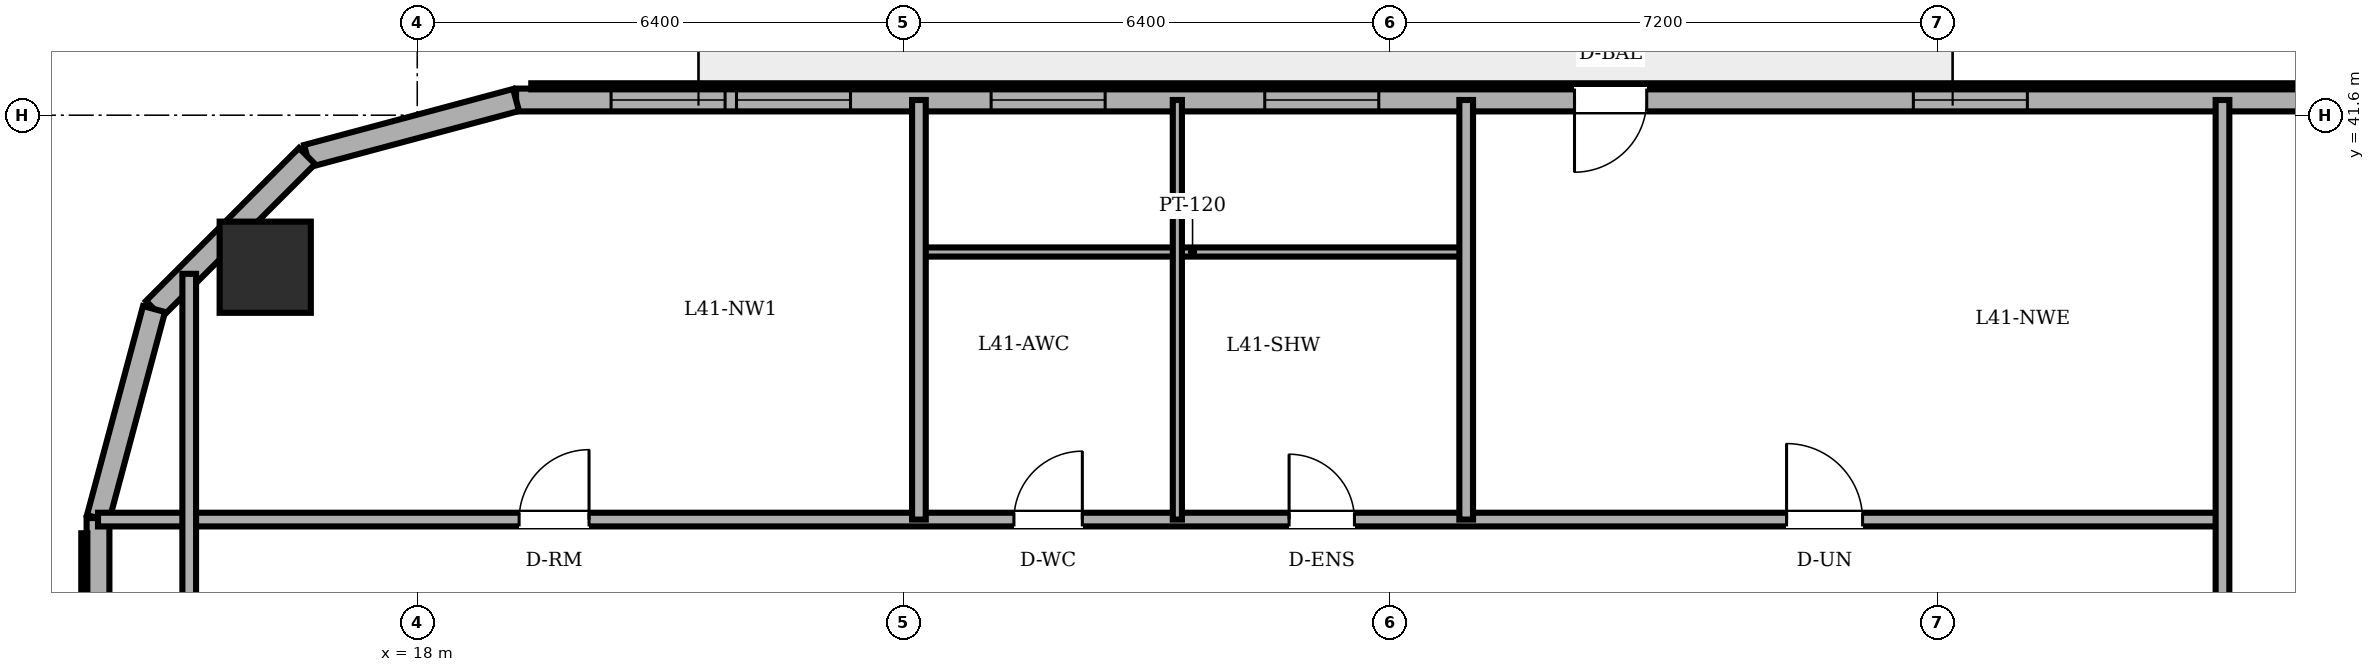
"""IFC4 building model, lengths in metres.
Left out: names, types, materials, properties, quantities, classifications, styles, units other than length and angle.
Written with IfcOpenShell. Run it as: python <this file> out.ifc"""

import sys

from ifc_helpers import new_model, si_unit, direction, frame, frame_2d, origin, origin_2d, place, context, subcontext, project, spatial, rectangle, circle, extrude, element, fill, save


model = new_model("IFC4")
c1 = context("Model", 3, precision=1e-05, world=origin(), true_north=direction((0.0, 1.0)))
c2 = subcontext(c1, "Body", "Model", "MODEL_VIEW")
j1 = project(units=[si_unit("LENGTHUNIT", "METRE"), si_unit("PLANEANGLEUNIT", "RADIAN")], contexts=[c1])
p1 = place(None, origin())
s1 = spatial("IfcSite", under=j1, at=p1, CompositionType="ELEMENT")
p2 = place(p1, origin())
s2 = spatial("IfcBuilding", under=s1, at=p2, CompositionType="ELEMENT")
p3 = place(p2, frame((0.0, 0.0, 158.2)))
s3 = spatial("IfcBuildingStorey", under=s2, at=p3, CompositionType="ELEMENT", Elevation=158.2)
p4 = place(p3, frame((16.0, 39.6, 0.0), z_axis=(0.0, 0.0, 1.0), x_axis=(1.0, 0.0, 0.0)))
e1 = element("IfcColumn", 1, at=p4, inside=s3, PredefinedType="COLUMN", context=c2, shape_type="SweptSolid", body=[
    extrude(circle(Radius=0.6, at=origin_2d()), origin(), (0.0, 0.0, 1.0), 3.6),
])
p5 = place(p3, frame((49.582, 41.8, 0.0), z_axis=(0.0, 0.0, 1.0), x_axis=(-1.0, 0.0, 0.0)))
e2 = element("IfcWall", 2, at=p5, inside=s3, PredefinedType="SOLIDWALL", context=c2, shape_type="SweptSolid", body=[
    extrude(rectangle(XDim=30.282, YDim=0.3, at=frame_2d((15.141, 0.0))), origin(), (0.0, 0.0, 1.0), 3.4),
])
p6 = place(p5, frame((15.407, 0.0, 0.0)))
e3 = element("IfcOpeningElement", 3, at=p6, cuts=e2, PredefinedType="OPENING", context=c2, shape_type="SweptSolid", body=[
    extrude(rectangle(XDim=0.95, YDim=2.2, at=frame_2d((0.475, 1.1))), frame((0.0, 0.16, 0.0), z_axis=(0.0, -1.0, 0.0), x_axis=(1.0, 0.0, 0.0)), (0.0, 0.0, 1.0), 0.32),
])
p7 = place(p5, frame((2.094, 0.0, 0.85)))
e4 = element("IfcOpeningElement", 4, at=p7, cuts=e2, PredefinedType="OPENING", context=c2, shape_type="SweptSolid", body=[
    extrude(rectangle(XDim=1.5, YDim=1.55, at=frame_2d((0.75, 0.775))), frame((0.0, 0.16, 0.0), z_axis=(0.0, -1.0, 0.0), x_axis=(1.0, 0.0, 0.0)), (0.0, 0.0, 1.0), 0.32),
])
p8 = place(p5, frame((4.588, 0.0, 0.85)))
e5 = element("IfcOpeningElement", 5, at=p8, cuts=e2, PredefinedType="OPENING", context=c2, shape_type="SweptSolid", body=[
    extrude(rectangle(XDim=1.5, YDim=1.55, at=frame_2d((0.75, 0.775))), frame((0.0, 0.16, 0.0), z_axis=(0.0, -1.0, 0.0), x_axis=(1.0, 0.0, 0.0)), (0.0, 0.0, 1.0), 0.32),
])
p9 = place(p5, frame((10.399, 0.0, 0.85)))
e6 = element("IfcOpeningElement", 6, at=p9, cuts=e2, PredefinedType="OPENING", context=c2, shape_type="SweptSolid", body=[
    extrude(rectangle(XDim=1.5, YDim=1.55, at=frame_2d((0.75, 0.775))), frame((0.0, 0.16, 0.0), z_axis=(0.0, -1.0, 0.0), x_axis=(1.0, 0.0, 0.0)), (0.0, 0.0, 1.0), 0.32),
])
p10 = place(p5, frame((18.932, 0.0, 0.85)))
e7 = element("IfcOpeningElement", 7, at=p10, cuts=e2, PredefinedType="OPENING", context=c2, shape_type="SweptSolid", body=[
    extrude(rectangle(XDim=1.5, YDim=1.55, at=frame_2d((0.75, 0.775))), frame((0.0, 0.16, 0.0), z_axis=(0.0, -1.0, 0.0), x_axis=(1.0, 0.0, 0.0)), (0.0, 0.0, 1.0), 0.32),
])
p11 = place(p5, frame((22.532, 0.0, 0.85)))
e8 = element("IfcOpeningElement", 8, at=p11, cuts=e2, PredefinedType="OPENING", context=c2, shape_type="SweptSolid", body=[
    extrude(rectangle(XDim=1.5, YDim=1.55, at=frame_2d((0.75, 0.775))), frame((0.0, 0.16, 0.0), z_axis=(0.0, -1.0, 0.0), x_axis=(1.0, 0.0, 0.0)), (0.0, 0.0, 1.0), 0.32),
])
p12 = place(p5, frame((25.882, 0.0, 0.85)))
e9 = element("IfcOpeningElement", 9, at=p12, cuts=e2, PredefinedType="OPENING", context=c2, shape_type="SweptSolid", body=[
    extrude(rectangle(XDim=1.5, YDim=1.55, at=frame_2d((0.75, 0.775))), frame((0.0, 0.16, 0.0), z_axis=(0.0, -1.0, 0.0), x_axis=(1.0, 0.0, 0.0)), (0.0, 0.0, 1.0), 0.32),
])
p13 = place(p5, frame((27.532, 0.0, 0.85)))
e10 = element("IfcOpeningElement", 10, at=p13, cuts=e2, PredefinedType="OPENING", context=c2, shape_type="SweptSolid", body=[
    extrude(rectangle(XDim=1.5, YDim=1.55, at=frame_2d((0.75, 0.775))), frame((0.0, 0.16, 0.0), z_axis=(0.0, -1.0, 0.0), x_axis=(1.0, 0.0, 0.0)), (0.0, 0.0, 1.0), 0.32),
])
p14 = place(p3, frame((19.3, 41.8, 0.0), z_axis=(0.0, 0.0, 1.0), x_axis=(-0.965908238586, -0.258884674387, 0.0)))
e11 = element("IfcWall", 11, at=p14, inside=s3, PredefinedType="SOLIDWALL", context=c2, shape_type="SweptSolid", body=[
    extrude(rectangle(XDim=2.847, YDim=0.3, at=frame_2d((1.424, 0.0))), origin(), (0.0, 0.0, 1.0), 3.4),
])
p15 = place(p3, frame((16.55, 41.063, 0.0), z_axis=(0.0, 0.0, 1.0), x_axis=(-0.707106781187, -0.707106781187, 0.0)))
e12 = element("IfcWall", 12, at=p15, inside=s3, PredefinedType="SOLIDWALL", context=c2, shape_type="SweptSolid", body=[
    extrude(rectangle(XDim=2.847, YDim=0.3, at=frame_2d((1.423, 0.0))), origin(), (0.0, 0.0, 1.0), 3.4),
])
p16 = place(p3, frame((14.537, 39.05, 0.0), z_axis=(0.0, 0.0, 1.0), x_axis=(-0.258884674387, -0.965908238586, 0.0)))
e13 = element("IfcWall", 13, at=p16, inside=s3, PredefinedType="SOLIDWALL", context=c2, shape_type="SweptSolid", body=[
    extrude(rectangle(XDim=2.847, YDim=0.3, at=frame_2d((1.424, 0.0))), origin(), (0.0, 0.0, 1.0), 3.4),
])
p17 = place(p3, frame((13.8, 36.3, 0.0), z_axis=(0.0, 0.0, 1.0), x_axis=(0.0, -1.0, 0.0)))
e14 = element("IfcWall", 14, at=p17, inside=s3, PredefinedType="SOLIDWALL", context=c2, shape_type="SweptSolid", body=[
    extrude(rectangle(XDim=24.6, YDim=0.3, at=frame_2d((12.3, 0.0))), origin(), (0.0, 0.0, 1.0), 3.4),
])
p18 = place(p17, frame((8.277, 0.0, 0.85)))
e15 = element("IfcOpeningElement", 15, at=p18, cuts=e14, PredefinedType="OPENING", context=c2, shape_type="SweptSolid", body=[
    extrude(rectangle(XDim=1.5, YDim=1.55, at=frame_2d((0.75, 0.775))), frame((0.0, 0.16, 0.0), z_axis=(0.0, -1.0, 0.0), x_axis=(1.0, 0.0, 0.0)), (0.0, 0.0, 1.0), 0.32),
])
p19 = place(p17, frame((14.823, 0.0, 0.85)))
e16 = element("IfcOpeningElement", 16, at=p19, cuts=e14, PredefinedType="OPENING", context=c2, shape_type="SweptSolid", body=[
    extrude(rectangle(XDim=1.5, YDim=1.55, at=frame_2d((0.75, 0.775))), frame((0.0, 0.16, 0.0), z_axis=(0.0, -1.0, 0.0), x_axis=(1.0, 0.0, 0.0)), (0.0, 0.0, 1.0), 0.32),
])
p20 = place(p3, frame((13.8, 36.28, 0.0), z_axis=(0.0, 0.0, 1.0), x_axis=(1.0, 0.0, 0.0)))
e17 = element("IfcWall", 17, at=p20, inside=s3, PredefinedType="PARTITIONING", context=c2, shape_type="SweptSolid", body=[
    extrude(rectangle(XDim=27.95, YDim=0.18, at=frame_2d((13.975, 0.0))), origin(), (0.0, 0.0, 1.0), 3.4),
])
p21 = place(p20, frame((12.05, 0.0, 0.0)))
e18 = element("IfcOpeningElement", 18, at=p21, cuts=e17, PredefinedType="OPENING", context=c2, shape_type="SweptSolid", body=[
    extrude(rectangle(XDim=0.9, YDim=2.1, at=frame_2d((0.45, 1.05))), frame((0.0, 0.1, 0.0), z_axis=(0.0, -1.0, 0.0), x_axis=(1.0, 0.0, 0.0)), (0.0, 0.0, 1.0), 0.2),
])
p22 = place(p20, frame((15.67, 0.0, 0.0)))
e19 = element("IfcOpeningElement", 19, at=p22, cuts=e17, PredefinedType="OPENING", context=c2, shape_type="SweptSolid", body=[
    extrude(rectangle(XDim=0.86, YDim=2.1, at=frame_2d((0.43, 1.05))), frame((0.0, 0.1, 0.0), z_axis=(0.0, -1.0, 0.0), x_axis=(1.0, 0.0, 0.0)), (0.0, 0.0, 1.0), 0.2),
])
p23 = place(p20, frame((5.54, 0.0, 0.0)))
e20 = element("IfcOpeningElement", 20, at=p23, cuts=e17, PredefinedType="OPENING", context=c2, shape_type="SweptSolid", body=[
    extrude(rectangle(XDim=0.92, YDim=2.1, at=frame_2d((0.46, 1.05))), frame((0.0, 0.1, 0.0), z_axis=(0.0, -1.0, 0.0), x_axis=(1.0, 0.0, 0.0)), (0.0, 0.0, 1.0), 0.2),
])
p24 = place(p20, frame((22.215, 0.0, 0.0)))
e21 = element("IfcOpeningElement", 21, at=p24, cuts=e17, PredefinedType="OPENING", context=c2, shape_type="SweptSolid", body=[
    extrude(rectangle(XDim=1.0, YDim=2.15, at=frame_2d((0.5, 1.075))), frame((0.0, 0.1, 0.0), z_axis=(0.0, -1.0, 0.0), x_axis=(1.0, 0.0, 0.0)), (0.0, 0.0, 1.0), 0.2),
])
p25 = place(p3, frame((24.6, 39.8, 0.0), z_axis=(0.0, 0.0, 1.0), x_axis=(1.0, 0.0, 0.0)))
e22 = element("IfcWall", 22, at=p25, inside=s3, PredefinedType="PARTITIONING", context=c2, shape_type="SweptSolid", body=[
    extrude(rectangle(XDim=7.2, YDim=0.12, at=frame_2d((3.6, 0.0))), origin(), (0.0, 0.0, 1.0), 2.882),
])
p26 = place(p3, frame((15.0, 33.82, 0.0), z_axis=(0.0, 0.0, 1.0), x_axis=(0.0, 1.0, 0.0)))
e23 = element("IfcWall", 23, at=p26, inside=s3, PredefinedType="PARTITIONING", context=c2, shape_type="SweptSolid", body=[
    extrude(rectangle(XDim=5.693, YDim=0.18, at=frame_2d((2.846, 0.0))), origin(), (0.0, 0.0, 1.0), 3.4),
])
p27 = place(p3, frame((24.6, 36.28, 0.0), z_axis=(0.0, 0.0, 1.0), x_axis=(0.0, 1.0, 0.0)))
e24 = element("IfcWall", 24, at=p27, inside=s3, PredefinedType="PARTITIONING", context=c2, shape_type="SweptSolid", body=[
    extrude(rectangle(XDim=5.52, YDim=0.18, at=frame_2d((2.76, 0.0))), origin(), (0.0, 0.0, 1.0), 3.4),
])
p28 = place(p3, frame((28.0, 36.28, 0.0), z_axis=(0.0, 0.0, 1.0), x_axis=(0.0, 1.0, 0.0)))
e25 = element("IfcWall", 25, at=p28, inside=s3, PredefinedType="PARTITIONING", context=c2, shape_type="SweptSolid", body=[
    extrude(rectangle(XDim=5.52, YDim=0.12, at=frame_2d((2.76, 0.0))), origin(), (0.0, 0.0, 1.0), 3.4),
])
p29 = place(p3, frame((31.8, 36.28, 0.0), z_axis=(0.0, 0.0, 1.0), x_axis=(0.0, 1.0, 0.0)))
e26 = element("IfcWall", 26, at=p29, inside=s3, PredefinedType="PARTITIONING", context=c2, shape_type="SweptSolid", body=[
    extrude(rectangle(XDim=5.52, YDim=0.18, at=frame_2d((2.76, 0.0))), origin(), (0.0, 0.0, 1.0), 3.4),
])
p30 = place(p3, frame((41.75, 25.18, 0.0), z_axis=(0.0, 0.0, 1.0), x_axis=(0.0, 1.0, 0.0)))
e27 = element("IfcWall", 27, at=p30, inside=s3, PredefinedType="PARTITIONING", context=c2, shape_type="SweptSolid", body=[
    extrude(rectangle(XDim=16.62, YDim=0.18, at=frame_2d((8.31, 0.0))), origin(), (0.0, 0.0, 1.0), 3.4),
])
p31 = place(p30, frame((5.35, 0.0, 0.0)))
e28 = element("IfcOpeningElement", 28, at=p31, cuts=e27, PredefinedType="OPENING", context=c2, shape_type="SweptSolid", body=[
    extrude(rectangle(XDim=0.92, YDim=2.1, at=frame_2d((0.46, 1.05))), frame((0.0, 0.1, 0.0), z_axis=(0.0, -1.0, 0.0), x_axis=(1.0, 0.0, 0.0)), (0.0, 0.0, 1.0), 0.2),
])
p32 = place(p6, origin())
e29 = element("IfcDoor", 29, at=p32, inside=s3, OperationType="SINGLE_SWING_RIGHT", PredefinedType="DOOR", context=c2, shape_type="SweptSolid", body=[
    extrude(rectangle(XDim=0.95, YDim=2.2, at=frame_2d((0.475, 1.1))), frame((0.0, 0.025, 0.0), z_axis=(0.0, -1.0, 0.0), x_axis=(1.0, 0.0, 0.0)), (0.0, 0.0, 1.0), 0.05),
])
fill(e3, e29)
p33 = place(p9, origin())
e30 = element("IfcWindow", 30, at=p33, inside=s3, PartitioningType="DOUBLE_PANEL_VERTICAL", PredefinedType="WINDOW", context=c2, shape_type="SweptSolid", body=[
    extrude(rectangle(XDim=1.5, YDim=1.55, at=frame_2d((0.75, 0.775))), frame((0.0, 0.03, 0.0), z_axis=(0.0, -1.0, 0.0), x_axis=(1.0, 0.0, 0.0)), (0.0, 0.0, 1.0), 0.06),
])
fill(e6, e30)
p34 = place(p10, origin())
e31 = element("IfcWindow", 31, at=p34, inside=s3, PartitioningType="DOUBLE_PANEL_VERTICAL", PredefinedType="WINDOW", context=c2, shape_type="SweptSolid", body=[
    extrude(rectangle(XDim=1.5, YDim=1.55, at=frame_2d((0.75, 0.775))), frame((0.0, 0.03, 0.0), z_axis=(0.0, -1.0, 0.0), x_axis=(1.0, 0.0, 0.0)), (0.0, 0.0, 1.0), 0.06),
])
fill(e7, e31)
p35 = place(p11, origin())
e32 = element("IfcWindow", 32, at=p35, inside=s3, PartitioningType="DOUBLE_PANEL_VERTICAL", PredefinedType="WINDOW", context=c2, shape_type="SweptSolid", body=[
    extrude(rectangle(XDim=1.5, YDim=1.55, at=frame_2d((0.75, 0.775))), frame((0.0, 0.03, 0.0), z_axis=(0.0, -1.0, 0.0), x_axis=(1.0, 0.0, 0.0)), (0.0, 0.0, 1.0), 0.06),
])
fill(e8, e32)
p36 = place(p12, origin())
e33 = element("IfcWindow", 33, at=p36, inside=s3, PartitioningType="DOUBLE_PANEL_VERTICAL", PredefinedType="WINDOW", context=c2, shape_type="SweptSolid", body=[
    extrude(rectangle(XDim=1.5, YDim=1.55, at=frame_2d((0.75, 0.775))), frame((0.0, 0.03, 0.0), z_axis=(0.0, -1.0, 0.0), x_axis=(1.0, 0.0, 0.0)), (0.0, 0.0, 1.0), 0.06),
])
fill(e9, e33)
p37 = place(p13, origin())
e34 = element("IfcWindow", 34, at=p37, inside=s3, PartitioningType="DOUBLE_PANEL_VERTICAL", PredefinedType="WINDOW", context=c2, shape_type="SweptSolid", body=[
    extrude(rectangle(XDim=1.5, YDim=1.55, at=frame_2d((0.75, 0.775))), frame((0.0, 0.03, 0.0), z_axis=(0.0, -1.0, 0.0), x_axis=(1.0, 0.0, 0.0)), (0.0, 0.0, 1.0), 0.06),
])
fill(e10, e34)
p38 = place(p21, origin())
e35 = element("IfcDoor", 35, at=p38, inside=s3, OperationType="SINGLE_SWING_RIGHT", PredefinedType="DOOR", context=c2, shape_type="SweptSolid", body=[
    extrude(rectangle(XDim=0.9, YDim=2.1, at=frame_2d((0.45, 1.05))), frame((0.0, 0.025, 0.0), z_axis=(0.0, -1.0, 0.0), x_axis=(1.0, 0.0, 0.0)), (0.0, 0.0, 1.0), 0.05),
])
fill(e18, e35)
p39 = place(p22, origin())
e36 = element("IfcDoor", 36, at=p39, inside=s3, OperationType="SINGLE_SWING_LEFT", PredefinedType="DOOR", context=c2, shape_type="SweptSolid", body=[
    extrude(rectangle(XDim=0.86, YDim=2.1, at=frame_2d((0.43, 1.05))), frame((0.0, 0.025, 0.0), z_axis=(0.0, -1.0, 0.0), x_axis=(1.0, 0.0, 0.0)), (0.0, 0.0, 1.0), 0.05),
])
fill(e19, e36)
p40 = place(p23, origin())
e37 = element("IfcDoor", 37, at=p40, inside=s3, OperationType="SINGLE_SWING_RIGHT", PredefinedType="DOOR", context=c2, shape_type="SweptSolid", body=[
    extrude(rectangle(XDim=0.92, YDim=2.1, at=frame_2d((0.46, 1.05))), frame((0.0, 0.025, 0.0), z_axis=(0.0, -1.0, 0.0), x_axis=(1.0, 0.0, 0.0)), (0.0, 0.0, 1.0), 0.05),
])
fill(e20, e37)
p41 = place(p24, origin())
e38 = element("IfcDoor", 38, at=p41, inside=s3, OperationType="SINGLE_SWING_LEFT", PredefinedType="DOOR", context=c2, shape_type="SweptSolid", body=[
    extrude(rectangle(XDim=1.0, YDim=2.15, at=frame_2d((0.5, 1.075))), frame((0.0, 0.025, 0.0), z_axis=(0.0, -1.0, 0.0), x_axis=(1.0, 0.0, 0.0)), (0.0, 0.0, 1.0), 0.05),
])
fill(e21, e38)
save(model, sys.argv[1])
